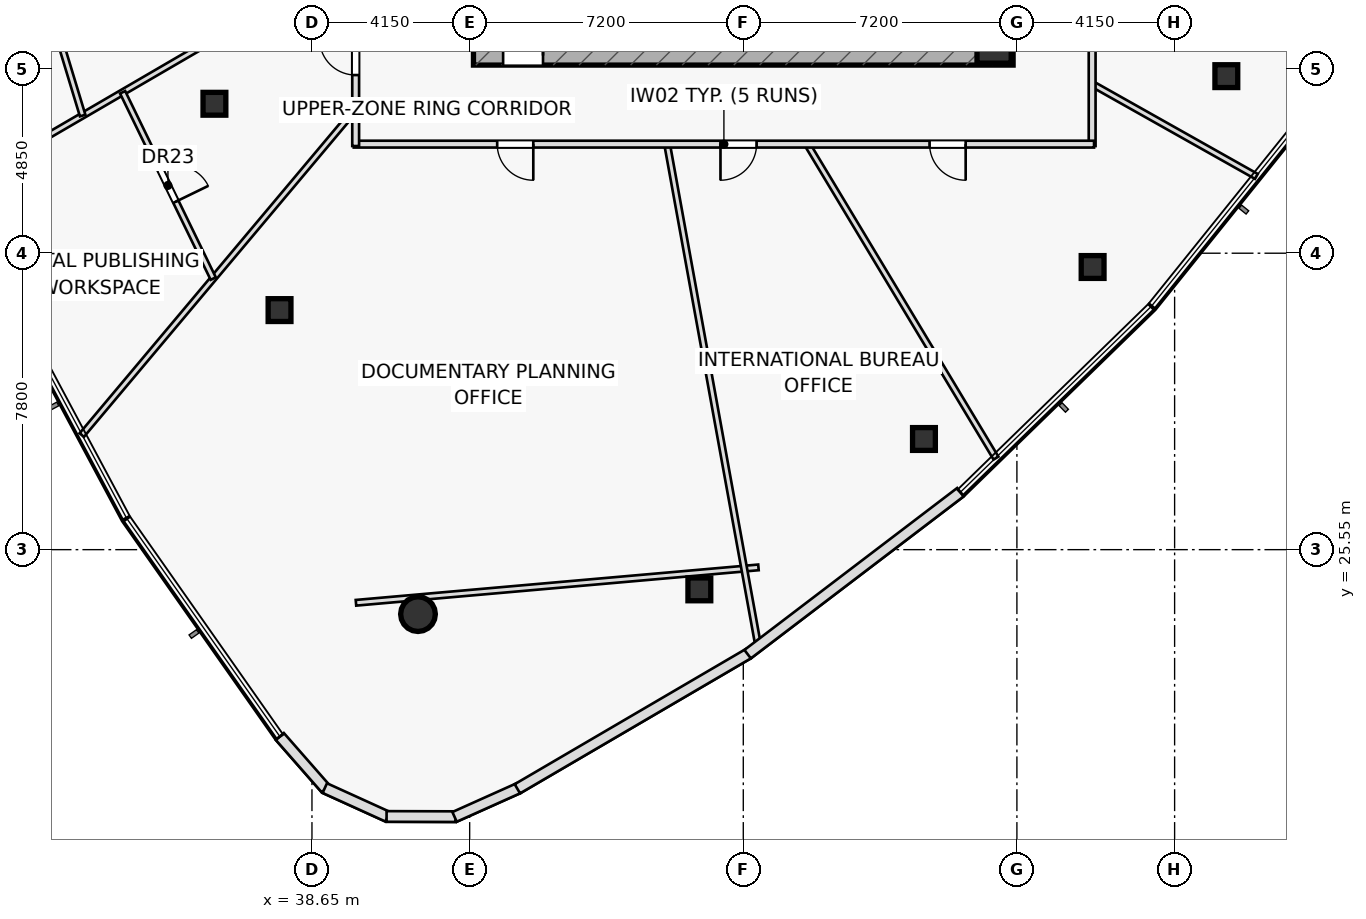
"""IFC4 building model, lengths in metres.
Left out: names, types, materials, properties, quantities, classifications, styles, units other than length and angle.
Written with IfcOpenShell. Run it as: python <this file> out.ifc"""

import sys

from ifc_helpers import new_model, si_unit, direction, frame, frame_2d, origin, origin_2d, place, context, subcontext, project, spatial, rectangle, hollow_rectangle, hollow_circle, extrude, element, fill, save


model = new_model("IFC4")
c1 = context("Model", 3, precision=1e-05, world=origin(), true_north=direction((0.0, 1.0)))
c2 = subcontext(c1, "Body", "Model", "MODEL_VIEW")
j1 = project(units=[si_unit("LENGTHUNIT", "METRE"), si_unit("PLANEANGLEUNIT", "RADIAN")], contexts=[c1])
p1 = place(None, origin())
s1 = spatial("IfcSite", under=j1, at=p1, CompositionType="ELEMENT")
p2 = place(p1, origin())
s2 = spatial("IfcBuilding", under=s1, at=p2, CompositionType="ELEMENT")
p3 = place(p2, frame((0.0, 0.0, 241.9)))
s3 = spatial("IfcBuildingStorey", under=s2, at=p3, CompositionType="ELEMENT", Elevation=241.9)
p4 = place(p3, frame((42.9, 38.55, 0.0), z_axis=(0.0, 0.0, 1.0), x_axis=(1.0, 0.0, 0.0)))
e1 = element("IfcWall", 1, at=p4, inside=s3, PredefinedType="SHEAR", context=c2, shape_type="SweptSolid", body=[
    extrude(rectangle(XDim=14.2, YDim=0.5, at=frame_2d((7.1, 0.0))), origin(), (0.0, 0.0, 1.0), 3.65),
])
p5 = place(p4, frame((0.78, 0.0, 0.0)))
e2 = element("IfcOpeningElement", 2, at=p5, cuts=e1, PredefinedType="OPENING", context=c2, shape_type="SweptSolid", body=[
    extrude(rectangle(XDim=1.05, YDim=2.2, at=frame_2d((0.525, 1.1))), frame((0.0, 0.26, 0.0), z_axis=(0.0, -1.0, 0.0), x_axis=(1.0, 0.0, 0.0)), (0.0, 0.0, 1.0), 0.52),
])
p6 = place(p3, frame((56.6, 38.8, 0.0), z_axis=(0.0, 0.0, 1.0), x_axis=(1.0, 0.0, 0.0)))
e3 = element("IfcColumn", 3, at=p6, inside=s3, PredefinedType="COLUMN", context=c2, shape_type="SweptSolid", body=[
    extrude(rectangle(XDim=0.9, YDim=0.9, at=origin_2d()), origin(), (0.0, 0.0, 1.0), 3.65),
])
for number, where, z_axis, x_axis in (
    (4, (36.083, 37.282, 0.0), (0.0, 0.0, 1.0), (1.0, 0.0, 0.0)),
    (5, (37.797, 31.853, 0.0), (0.0, 0.0, 1.0), (1.0, 0.0, 0.0)),
):
    element("IfcColumn", number, at=place(p3, frame(where, z_axis=z_axis, x_axis=x_axis)), inside=s3, PredefinedType="COLUMN", context=c2, shape_type="SweptSolid", body=[
        extrude(hollow_rectangle(XDim=0.6, YDim=0.6, WallThickness=0.036, at=origin_2d()), origin(), (0.0, 0.0, 1.0), 3.65),
    ])
p7 = place(p3, frame((41.44, 23.854, 0.0), z_axis=(0.0, 0.0, 1.0), x_axis=(1.0, 0.0, 0.0)))
e6 = element("IfcColumn", 6, at=p7, inside=s3, PredefinedType="COLUMN", context=c2, shape_type="SweptSolid", body=[
    extrude(hollow_circle(Radius=0.457, WallThickness=0.04, at=origin_2d()), origin(), (0.0, 0.0, 1.0), 3.65),
])
for number, where, z_axis, x_axis in (
    (7, (48.844, 24.505, 0.0), (0.0, 0.0, 1.0), (1.0, 0.0, 0.0)),
    (8, (54.754, 28.462, 0.0), (0.0, 0.0, 1.0), (1.0, 0.0, 0.0)),
    (9, (59.192, 32.987, 0.0), (0.0, 0.0, 1.0), (1.0, 0.0, 0.0)),
    (10, (62.711, 38.009, 0.0), (0.0, 0.0, 1.0), (1.0, 0.0, 0.0)),
):
    element("IfcColumn", number, at=place(p3, frame(where, z_axis=z_axis, x_axis=x_axis)), inside=s3, PredefinedType="COLUMN", context=c2, shape_type="SweptSolid", body=[
        extrude(hollow_rectangle(XDim=0.6, YDim=0.6, WallThickness=0.036, at=origin_2d()), origin(), (0.0, 0.0, 1.0), 3.65),
    ])
p8 = place(p3, frame((39.808, 24.152, 0.0), z_axis=(0.0, 0.0, 1.0), x_axis=(0.996153584085, 0.087624408208, 0.0)))
e11 = element("IfcWall", 11, at=p8, inside=s3, PredefinedType="PARTITIONING", context=c2, shape_type="SweptSolid", body=[
    extrude(rectangle(XDim=10.632, YDim=0.15, at=frame_2d((5.316, 0.0))), origin(), (0.0, 0.0, 1.0), 3.135),
])
p9 = place(p3, frame((38.227, 40.24, 0.0), z_axis=(0.0, 0.0, 1.0), x_axis=(-0.864129548562, -0.503269434103, 0.0)))
e12 = element("IfcWall", 12, at=p9, inside=s3, PredefinedType="PARTITIONING", context=c2, shape_type="SweptSolid", body=[
    extrude(rectangle(XDim=10.146, YDim=0.15, at=frame_2d((5.073, 0.0))), origin(), (0.0, 0.0, 1.0), 3.135),
])
p10 = place(p3, frame((39.8, 37.144, 0.0), z_axis=(0.0, 0.0, 1.0), x_axis=(-0.643250336072, -0.765655931305, 0.0)))
e13 = element("IfcWall", 13, at=p10, inside=s3, PredefinedType="PARTITIONING", context=c2, shape_type="SweptSolid", body=[
    extrude(rectangle(XDim=11.205, YDim=0.15, at=frame_2d((5.603, 0.0))), origin(), (0.0, 0.0, 1.0), 3.135),
])
p11 = place(p3, frame((47.995, 36.22, 0.0), z_axis=(0.0, 0.0, 1.0), x_axis=(0.178747904514, -0.983894906294, 0.0)))
e14 = element("IfcWall", 14, at=p11, inside=s3, PredefinedType="PARTITIONING", context=c2, shape_type="SweptSolid", body=[
    extrude(rectangle(XDim=13.434, YDim=0.15, at=frame_2d((6.717, 0.0))), origin(), (0.0, 0.0, 1.0), 3.135),
])
p12 = place(p3, frame((51.68, 36.22, 0.0), z_axis=(0.0, 0.0, 1.0), x_axis=(0.51539302826, -0.856953923161, 0.0)))
e15 = element("IfcWall", 15, at=p12, inside=s3, PredefinedType="PARTITIONING", context=c2, shape_type="SweptSolid", body=[
    extrude(rectangle(XDim=9.64, YDim=0.15, at=frame_2d((4.82, 0.0))), origin(), (0.0, 0.0, 1.0), 3.025),
])
p13 = place(p3, frame((59.18, 37.804, 0.0), z_axis=(0.0, 0.0, 1.0), x_axis=(0.871373014064, -0.490621106721, 0.0)))
e16 = element("IfcWall", 16, at=p13, inside=s3, PredefinedType="PARTITIONING", context=c2, shape_type="SweptSolid", body=[
    extrude(rectangle(XDim=4.96, YDim=0.15, at=frame_2d((2.48, 0.0))), origin(), (0.0, 0.0, 1.0), 3.135),
])
p14 = place(p3, frame((30.42, 44.213, 0.0), z_axis=(0.0, 0.0, 1.0), x_axis=(0.290235748061, -0.956955176875, 0.0)))
e17 = element("IfcWall", 17, at=p14, inside=s3, PredefinedType="PARTITIONING", context=c2, shape_type="SweptSolid", body=[
    extrude(rectangle(XDim=7.566, YDim=0.15, at=frame_2d((3.783, 0.0))), origin(), (0.0, 0.0, 1.0), 3.65),
])
p15 = place(p14, frame((3.308, 0.0, 0.0)))
e18 = element("IfcOpeningElement", 18, at=p15, cuts=e17, PredefinedType="OPENING", context=c2, shape_type="SweptSolid", body=[
    extrude(rectangle(XDim=0.95, YDim=2.05, at=frame_2d((0.475, 1.025))), frame((0.0, 0.085, 0.0), z_axis=(0.0, -1.0, 0.0), x_axis=(1.0, 0.0, 0.0)), (0.0, 0.0, 1.0), 0.17),
])
p16 = place(p3, frame((33.668, 37.585, 0.0), z_axis=(0.0, 0.0, 1.0), x_axis=(0.437333578749, -0.899299361113, 0.0)))
e19 = element("IfcWall", 19, at=p16, inside=s3, PredefinedType="PARTITIONING", context=c2, shape_type="SweptSolid", body=[
    extrude(rectangle(XDim=5.451, YDim=0.15, at=frame_2d((2.726, 0.0))), origin(), (0.0, 0.0, 1.0), 3.65),
])
p17 = place(p16, frame((2.25, 0.0, 0.0)))
e20 = element("IfcOpeningElement", 20, at=p17, cuts=e19, PredefinedType="OPENING", context=c2, shape_type="SweptSolid", body=[
    extrude(rectangle(XDim=0.95, YDim=2.05, at=frame_2d((0.475, 1.025))), frame((0.0, 0.085, 0.0), z_axis=(0.0, -1.0, 0.0), x_axis=(1.0, 0.0, 0.0)), (0.0, 0.0, 1.0), 0.17),
])
p18 = place(p3, frame((59.18, 41.1, 0.0), z_axis=(0.0, 0.0, 1.0), x_axis=(0.0, -1.0, 0.0)))
e21 = element("IfcWall", 21, at=p18, inside=s3, PredefinedType="PARTITIONING", context=c2, shape_type="SweptSolid", body=[
    extrude(rectangle(XDim=4.93, YDim=0.18, at=frame_2d((2.465, 0.0))), origin(), (0.0, 0.0, 1.0), 3.325),
])
p19 = place(p18, frame((1.316, 0.0, 0.0)))
e22 = element("IfcOpeningElement", 22, at=p19, cuts=e21, PredefinedType="OPENING", context=c2, shape_type="SweptSolid", body=[
    extrude(rectangle(XDim=0.95, YDim=2.05, at=frame_2d((0.475, 1.025))), frame((0.0, 0.1, 0.0), z_axis=(0.0, -1.0, 0.0), x_axis=(1.0, 0.0, 0.0)), (0.0, 0.0, 1.0), 0.2),
])
p20 = place(p3, frame((59.23, 36.22, 0.0), z_axis=(0.0, 0.0, 1.0), x_axis=(-1.0, 0.0, 0.0)))
e23 = element("IfcWall", 23, at=p20, inside=s3, PredefinedType="PARTITIONING", context=c2, shape_type="SweptSolid", body=[
    extrude(rectangle(XDim=19.48, YDim=0.18, at=frame_2d((9.74, 0.0))), origin(), (0.0, 0.0, 1.0), 3.025),
])
p21 = place(p20, frame((3.378, 0.0, 0.0)))
e24 = element("IfcOpeningElement", 24, at=p21, cuts=e23, PredefinedType="OPENING", context=c2, shape_type="SweptSolid", body=[
    extrude(rectangle(XDim=0.95, YDim=2.05, at=frame_2d((0.475, 1.025))), frame((0.0, 0.1, 0.0), z_axis=(0.0, -1.0, 0.0), x_axis=(1.0, 0.0, 0.0)), (0.0, 0.0, 1.0), 0.2),
])
p22 = place(p20, frame((8.88, 0.0, 0.0)))
e25 = element("IfcOpeningElement", 25, at=p22, cuts=e23, PredefinedType="OPENING", context=c2, shape_type="SweptSolid", body=[
    extrude(rectangle(XDim=0.95, YDim=2.05, at=frame_2d((0.475, 1.025))), frame((0.0, 0.1, 0.0), z_axis=(0.0, -1.0, 0.0), x_axis=(1.0, 0.0, 0.0)), (0.0, 0.0, 1.0), 0.2),
])
p23 = place(p20, frame((14.756, 0.0, 0.0)))
e26 = element("IfcOpeningElement", 26, at=p23, cuts=e23, PredefinedType="OPENING", context=c2, shape_type="SweptSolid", body=[
    extrude(rectangle(XDim=0.95, YDim=2.05, at=frame_2d((0.475, 1.025))), frame((0.0, 0.1, 0.0), z_axis=(0.0, -1.0, 0.0), x_axis=(1.0, 0.0, 0.0)), (0.0, 0.0, 1.0), 0.2),
])
p24 = place(p3, frame((39.8, 36.17, 0.0), z_axis=(0.0, 0.0, 1.0), x_axis=(0.0, 1.0, 0.0)))
e27 = element("IfcWall", 27, at=p24, inside=s3, PredefinedType="PARTITIONING", context=c2, shape_type="SweptSolid", body=[
    extrude(rectangle(XDim=4.08, YDim=0.18, at=frame_2d((2.04, 0.0))), origin(), (0.0, 0.0, 1.0), 3.325),
])
p25 = place(p24, frame((1.868, 0.0, 0.0)))
e28 = element("IfcOpeningElement", 28, at=p25, cuts=e27, PredefinedType="OPENING", context=c2, shape_type="SweptSolid", body=[
    extrude(rectangle(XDim=0.95, YDim=2.05, at=frame_2d((0.475, 1.025))), frame((0.0, 0.1, 0.0), z_axis=(0.0, -1.0, 0.0), x_axis=(1.0, 0.0, 0.0)), (0.0, 0.0, 1.0), 0.2),
])
p26 = place(p3, frame((37.805, 20.634, 0.0), z_axis=(0.0, 0.0, 1.0), x_axis=(0.659420616348, -0.751774201961, 0.0)))
e29 = element("IfcWall", 29, at=p26, inside=s3, PredefinedType="STANDARD", context=c2, shape_type="SweptSolid", body=[
    extrude(rectangle(XDim=1.829, YDim=0.28, at=frame_2d((0.915, 0.0))), origin(), (0.0, 0.0, 1.0), 3.65),
])
p27 = place(p3, frame((38.987, 19.276, 0.0), z_axis=(0.0, 0.0, 1.0), x_axis=(0.910311276015, -0.41392436599, 0.0)))
e30 = element("IfcWall", 30, at=p27, inside=s3, PredefinedType="STANDARD", context=c2, shape_type="SweptSolid", body=[
    extrude(rectangle(XDim=1.818, YDim=0.28, at=frame_2d((0.909, 0.0))), origin(), (0.0, 0.0, 1.0), 3.65),
])
p28 = place(p3, frame((40.614, 18.53, 0.0), z_axis=(0.0, 0.0, 1.0), x_axis=(0.999996391737, -0.002686356996, 0.0)))
e31 = element("IfcWall", 31, at=p28, inside=s3, PredefinedType="STANDARD", context=c2, shape_type="SweptSolid", body=[
    extrude(rectangle(XDim=1.818, YDim=0.28, at=frame_2d((0.909, 0.0))), origin(), (0.0, 0.0, 1.0), 3.65),
])
p29 = place(p3, frame((42.403, 18.519, 0.0), z_axis=(0.0, 0.0, 1.0), x_axis=(0.912471754065, 0.409139704788, 0.0)))
e32 = element("IfcWall", 32, at=p29, inside=s3, PredefinedType="STANDARD", context=c2, shape_type="SweptSolid", body=[
    extrude(rectangle(XDim=1.84, YDim=0.28, at=frame_2d((0.92, 0.0))), origin(), (0.0, 0.0, 1.0), 3.65),
])
p30 = place(p3, frame((44.055, 19.258, 0.0), z_axis=(0.0, 0.0, 1.0), x_axis=(0.863191590825, 0.504876497302, 0.0)))
e33 = element("IfcWall", 33, at=p30, inside=s3, PredefinedType="STANDARD", context=c2, shape_type="SweptSolid", body=[
    extrude(rectangle(XDim=7.048, YDim=0.28, at=frame_2d((3.524, 0.0))), origin(), (0.0, 0.0, 1.0), 3.65),
])
p31 = place(p3, frame((50.114, 22.8, 0.0), z_axis=(0.0, 0.0, 1.0), x_axis=(0.795758171599, 0.605614508027, 0.0)))
e34 = element("IfcWall", 34, at=p31, inside=s3, PredefinedType="STANDARD", context=c2, shape_type="SweptSolid", body=[
    extrude(rectangle(XDim=7.036, YDim=0.28, at=frame_2d((3.518, 0.0))), origin(), (0.0, 0.0, 1.0), 3.65),
])
p32 = place(p5, origin())
e35 = element("IfcDoor", 35, at=p32, inside=s3, OperationType="SINGLE_SWING_RIGHT", PredefinedType="DOOR", context=c2, shape_type="SweptSolid", body=[
    extrude(rectangle(XDim=1.05, YDim=2.2, at=frame_2d((0.525, 1.1))), frame((0.0, 0.025, 0.0), z_axis=(0.0, -1.0, 0.0), x_axis=(1.0, 0.0, 0.0)), (0.0, 0.0, 1.0), 0.05),
])
fill(e2, e35)
p33 = place(p17, origin())
e36 = element("IfcDoor", 36, at=p33, inside=s3, OperationType="SINGLE_SWING_RIGHT", PredefinedType="DOOR", context=c2, shape_type="SweptSolid", body=[
    extrude(rectangle(XDim=0.95, YDim=2.05, at=frame_2d((0.475, 1.025))), frame((0.0, 0.025, 0.0), z_axis=(0.0, -1.0, 0.0), x_axis=(1.0, 0.0, 0.0)), (0.0, 0.0, 1.0), 0.05),
])
fill(e20, e36)
p34 = place(p21, origin())
e37 = element("IfcDoor", 37, at=p34, inside=s3, OperationType="SINGLE_SWING_LEFT", PredefinedType="DOOR", context=c2, shape_type="SweptSolid", body=[
    extrude(rectangle(XDim=0.95, YDim=2.05, at=frame_2d((0.475, 1.025))), frame((0.0, 0.025, 0.0), z_axis=(0.0, -1.0, 0.0), x_axis=(1.0, 0.0, 0.0)), (0.0, 0.0, 1.0), 0.05),
])
fill(e24, e37)
p35 = place(p22, origin())
e38 = element("IfcDoor", 38, at=p35, inside=s3, OperationType="SINGLE_SWING_RIGHT", PredefinedType="DOOR", context=c2, shape_type="SweptSolid", body=[
    extrude(rectangle(XDim=0.95, YDim=2.05, at=frame_2d((0.475, 1.025))), frame((0.0, 0.025, 0.0), z_axis=(0.0, -1.0, 0.0), x_axis=(1.0, 0.0, 0.0)), (0.0, 0.0, 1.0), 0.05),
])
fill(e25, e38)
p36 = place(p23, origin())
e39 = element("IfcDoor", 39, at=p36, inside=s3, OperationType="SINGLE_SWING_LEFT", PredefinedType="DOOR", context=c2, shape_type="SweptSolid", body=[
    extrude(rectangle(XDim=0.95, YDim=2.05, at=frame_2d((0.475, 1.025))), frame((0.0, 0.025, 0.0), z_axis=(0.0, -1.0, 0.0), x_axis=(1.0, 0.0, 0.0)), (0.0, 0.0, 1.0), 0.05),
])
fill(e26, e39)
p37 = place(p25, origin())
e40 = element("IfcDoor", 40, at=p37, inside=s3, OperationType="SINGLE_SWING_RIGHT", PredefinedType="DOOR", context=c2, shape_type="SweptSolid", body=[
    extrude(rectangle(XDim=0.95, YDim=2.05, at=frame_2d((0.475, 1.025))), frame((0.0, 0.025, 0.0), z_axis=(0.0, -1.0, 0.0), x_axis=(1.0, 0.0, 0.0)), (0.0, 0.0, 1.0), 0.05),
])
fill(e28, e40)
save(model, sys.argv[1])
